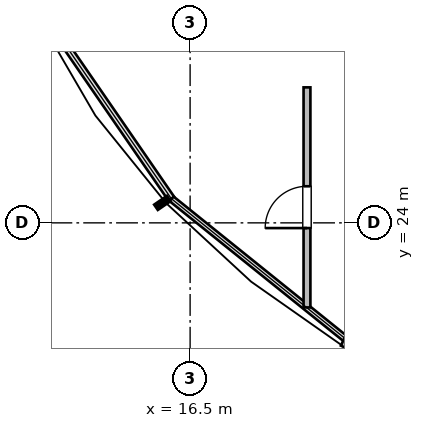
"""IFC4 building model, lengths in metres.
Left out: names, types, materials, properties, quantities, classifications, styles, units other than length and angle.
Written with IfcOpenShell. Run it as: python <this file> out.ifc"""

import sys

from ifc_helpers import new_model, si_unit, direction, frame, frame_2d, origin, place, context, subcontext, project, spatial, rectangle, extrude, element, fill, save


model = new_model("IFC4")
c1 = context("Model", 3, precision=1e-05, world=origin(), true_north=direction((0.0, 1.0)))
c2 = subcontext(c1, "Body", "Model", "MODEL_VIEW")
j1 = project(units=[si_unit("LENGTHUNIT", "METRE"), si_unit("PLANEANGLEUNIT", "RADIAN")], contexts=[c1])
p1 = place(None, origin())
s1 = spatial("IfcSite", under=j1, at=p1, CompositionType="ELEMENT")
p2 = place(p1, origin())
s2 = spatial("IfcBuilding", under=s1, at=p2, CompositionType="ELEMENT")
p3 = place(p2, frame((0.0, 0.0, 160.2)))
s3 = spatial("IfcBuildingStorey", under=s2, at=p3, CompositionType="ELEMENT", Elevation=160.2)
p4 = place(p3, frame((26.994, 17.88, 0.0), z_axis=(0.0, 0.0, 1.0), x_axis=(-0.905106920297, 0.425184034073, 0.0)))
e1 = element("IfcWall", 1, at=p4, inside=s3, PredefinedType="STANDARD", context=c2, shape_type="SweptSolid", body=[
    extrude(rectangle(XDim=7.136, YDim=0.32, at=frame_2d((3.568, 0.0))), origin(), (0.0, 0.0, 1.0), 2.657),
])
p5 = place(p3, frame((19.575, 21.775, 0.0), z_axis=(0.0, 0.0, 1.0), x_axis=(0.0, 1.0, 0.0)))
e2 = element("IfcWall", 2, at=p5, inside=s3, PredefinedType="PARTITIONING", context=c2, shape_type="SweptSolid", body=[
    extrude(rectangle(XDim=5.79, YDim=0.18, at=frame_2d((2.895, 0.0))), origin(), (0.0, 0.0, 1.0), 3.36),
])
p6 = place(p5, frame((2.088, 0.0, 0.0)))
e3 = element("IfcOpeningElement", 3, at=p6, cuts=e2, PredefinedType="OPENING", context=c2, shape_type="SweptSolid", body=[
    extrude(rectangle(XDim=1.1, YDim=2.1, at=frame_2d((0.55, 1.05))), frame((0.0, 0.1, 0.0), z_axis=(0.0, -1.0, 0.0), x_axis=(1.0, 0.0, 0.0)), (0.0, 0.0, 1.0), 0.2),
])
p7 = place(p6, origin())
e4 = element("IfcDoor", 4, at=p7, inside=s3, OperationType="SINGLE_SWING_LEFT", PredefinedType="DOOR", context=c2, shape_type="SweptSolid", body=[
    extrude(rectangle(XDim=1.1, YDim=2.1, at=frame_2d((0.55, 1.05))), frame((0.0, 0.025, 0.0), z_axis=(0.0, -1.0, 0.0), x_axis=(1.0, 0.0, 0.0)), (0.0, 0.0, 1.0), 0.05),
])
fill(e3, e4)
save(model, sys.argv[1])
